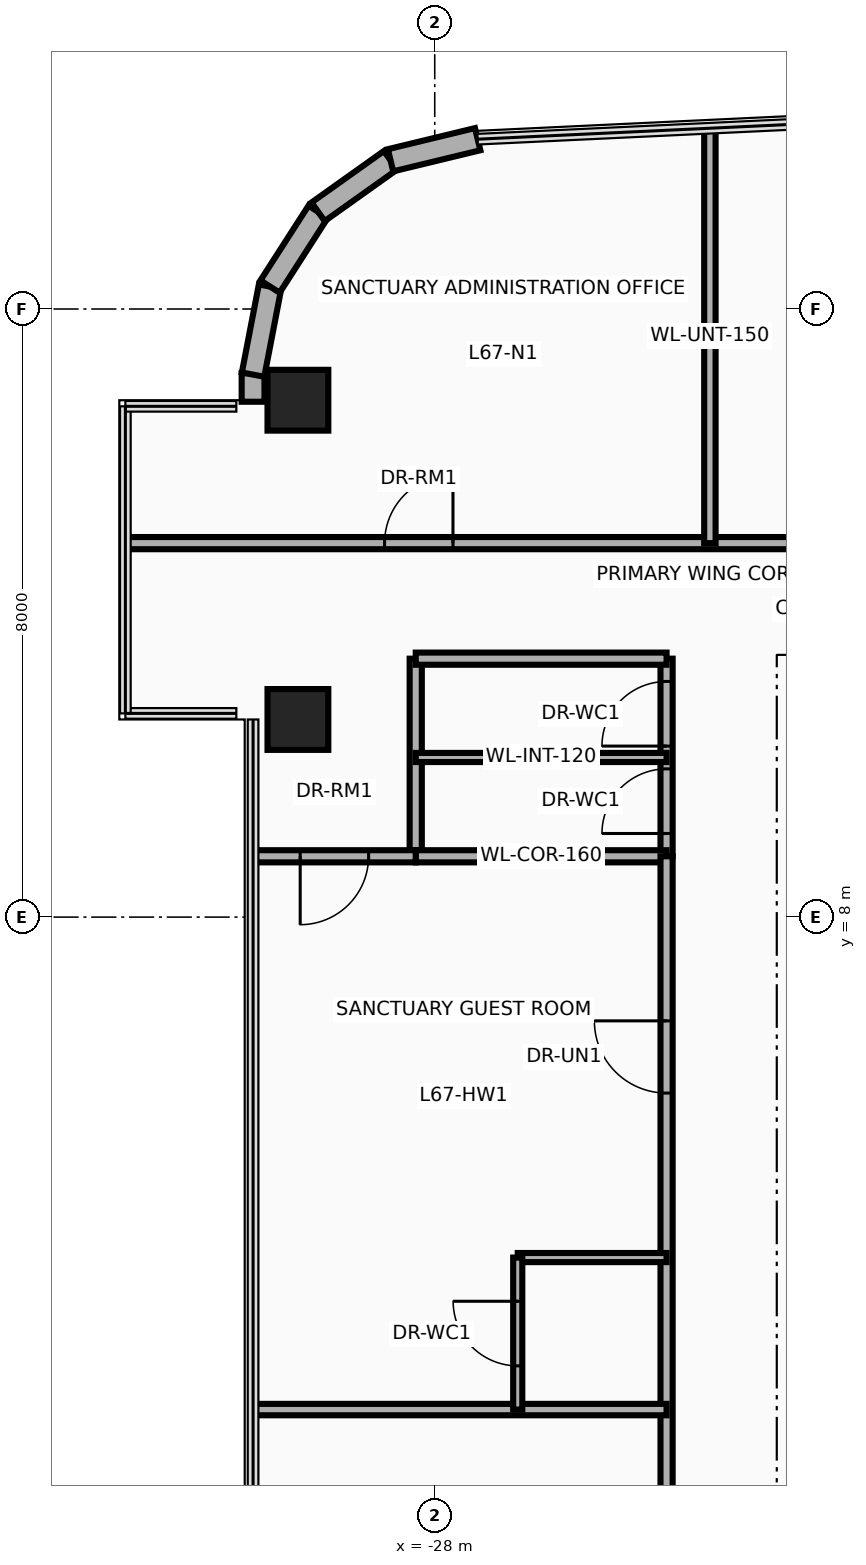
"""IFC4 building model, lengths in metres.
Left out: names, types, materials, properties, quantities, classifications, styles, units other than length and angle.
Written with IfcOpenShell. Run it as: python <this file> out.ifc"""

import sys

from ifc_helpers import new_model, si_unit, direction, frame, frame_2d, origin, origin_2d, place, context, subcontext, project, spatial, rectangle, extrude, source, transform, mapped, element, fill, save


model = new_model("IFC4")
c1 = context("Model", 3, precision=1e-05, world=origin(), true_north=direction((0.0, 1.0)))
c2 = subcontext(c1, "Body", "Model", "MODEL_VIEW")
j1 = project(units=[si_unit("LENGTHUNIT", "METRE"), si_unit("PLANEANGLEUNIT", "RADIAN")], contexts=[c1])
p1 = place(None, origin())
s1 = spatial("IfcSite", under=j1, at=p1, CompositionType="ELEMENT")
p2 = place(p1, origin())
s2 = spatial("IfcBuilding", under=s1, at=p2, CompositionType="ELEMENT")
p3 = place(p2, frame((0.0, 0.0, 258.0)))
s3 = spatial("IfcBuildingStorey", under=s2, at=p3, CompositionType="ELEMENT", Elevation=258.0)
m1 = source(origin(), c2, "Body", "SweptSolid", [
    extrude(rectangle(XDim=0.8, YDim=0.8, at=origin_2d()), origin(), (0.0, 0.0, 1.0), 3.5),
])
for number, where, z_axis, x_axis in (
    (1, (-29.8, 10.6, 0.0), (0.0, 0.0, 1.0), (1.0, 0.0, 0.0)),
    (2, (-29.8, 14.8, 0.0), (0.0, 0.0, 1.0), (1.0, 0.0, 0.0)),
):
    element("IfcColumn", number, at=place(p3, frame(where, z_axis=z_axis, x_axis=x_axis)), inside=s3, PredefinedType="COLUMN", context=c2, shape_type="MappedRepresentation", body=[
        mapped(m1, transform((0.0, 0.0, 0.0), x_axis=(1.0, 0.0, 0.0), y_axis=(0.0, 1.0, 0.0), z_axis=(0.0, 0.0, 1.0), scale=1.0)),
    ])
p4 = place(p3, frame((-30.39, 14.78, 0.0), z_axis=(0.0, 0.0, 1.0), x_axis=(0.0, 1.0, 0.0)))
e3 = element("IfcWall", 3, at=p4, inside=s3, PredefinedType="SOLIDWALL", context=c2, shape_type="SweptSolid", body=[
    extrude(rectangle(XDim=0.377, YDim=0.3, at=frame_2d((0.188, 0.0))), origin(), (0.0, 0.0, 1.0), 3.26),
])
p5 = place(p3, frame((-30.39, 15.137, 0.0), z_axis=(0.0, 0.0, 1.0), x_axis=(0.189307792679, 0.981917796779, 0.0)))
e4 = element("IfcWall", 4, at=p5, inside=s3, PredefinedType="SOLIDWALL", context=c2, shape_type="SweptSolid", body=[
    extrude(rectangle(XDim=1.18, YDim=0.3, at=frame_2d((0.59, 0.0))), origin(), (0.0, 0.0, 1.0), 3.26),
])
p6 = place(p3, frame((-30.167, 16.295, 0.0), z_axis=(0.0, 0.0, 1.0), x_axis=(0.540842020947, 0.841124193195, 0.0)))
e5 = element("IfcWall", 5, at=p6, inside=s3, PredefinedType="SOLIDWALL", context=c2, shape_type="SweptSolid", body=[
    extrude(rectangle(XDim=1.169, YDim=0.3, at=frame_2d((0.584, 0.0))), origin(), (0.0, 0.0, 1.0), 3.26),
])
p7 = place(p3, frame((-29.534, 17.279, 0.0), z_axis=(0.0, 0.0, 1.0), x_axis=(0.81466371606, 0.579933642527, 0.0)))
e6 = element("IfcWall", 6, at=p7, inside=s3, PredefinedType="SOLIDWALL", context=c2, shape_type="SweptSolid", body=[
    extrude(rectangle(XDim=1.169, YDim=0.3, at=frame_2d((0.584, 0.0))), origin(), (0.0, 0.0, 1.0), 3.26),
])
p8 = place(p3, frame((-28.582, 17.957, 0.0), z_axis=(0.0, 0.0, 1.0), x_axis=(0.971929016595, 0.235274279725, 0.0)))
e7 = element("IfcWall", 7, at=p8, inside=s3, PredefinedType="SOLIDWALL", context=c2, shape_type="SweptSolid", body=[
    extrude(rectangle(XDim=1.18, YDim=0.3, at=frame_2d((0.59, 0.0))), origin(), (0.0, 0.0, 1.0), 3.26),
])
p9 = place(p3, frame((-28.25, 8.8, 0.0), z_axis=(0.0, 0.0, 1.0), x_axis=(0.0, 1.0, 0.0)))
e8 = element("IfcWall", 8, at=p9, inside=s3, PredefinedType="PARTITIONING", context=c2, shape_type="SweptSolid", body=[
    extrude(rectangle(XDim=2.6, YDim=0.16, at=frame_2d((1.3, 0.0))), origin(), (0.0, 0.0, 1.0), 2.623),
])
p10 = place(p3, frame((-24.95, 8.8, 0.0), z_axis=(0.0, 0.0, 1.0), x_axis=(0.0, 1.0, 0.0)))
e9 = element("IfcWall", 9, at=p10, inside=s3, PredefinedType="PARTITIONING", context=c2, shape_type="SweptSolid", body=[
    extrude(rectangle(XDim=2.6, YDim=0.16, at=frame_2d((1.3, 0.0))), origin(), (0.0, 0.0, 1.0), 2.623),
])
p11 = place(p10, frame((0.3, 0.0, 0.0)))
e10 = element("IfcOpeningElement", 10, at=p11, cuts=e9, PredefinedType="OPENING", context=c2, shape_type="SweptSolid", body=[
    extrude(rectangle(XDim=0.85, YDim=2.1, at=frame_2d((0.425, 1.05))), frame((0.0, 0.095, 0.0), z_axis=(0.0, -1.0, 0.0), x_axis=(1.0, 0.0, 0.0)), (0.0, 0.0, 1.0), 0.19),
])
p12 = place(p10, frame((1.45, 0.0, 0.0)))
e11 = element("IfcOpeningElement", 11, at=p12, cuts=e9, PredefinedType="OPENING", context=c2, shape_type="SweptSolid", body=[
    extrude(rectangle(XDim=0.85, YDim=2.1, at=frame_2d((0.425, 1.05))), frame((0.0, 0.095, 0.0), z_axis=(0.0, -1.0, 0.0), x_axis=(1.0, 0.0, 0.0)), (0.0, 0.0, 1.0), 0.19),
])
for number, where, z_axis, x_axis in (
    (12, (-28.25, 8.8, 0.0), (0.0, 0.0, 1.0), (1.0, 0.0, 0.0)),
    (13, (-28.25, 11.4, 0.0), (0.0, 0.0, 1.0), (1.0, 0.0, 0.0)),
):
    element("IfcWall", number, at=place(p3, frame(where, z_axis=z_axis, x_axis=x_axis)), inside=s3, PredefinedType="PARTITIONING", context=c2, shape_type="SweptSolid", body=[
        extrude(rectangle(XDim=3.3, YDim=0.16, at=frame_2d((1.65, 0.0))), origin(), (0.0, 0.0, 1.0), 3.26),
    ])
p13 = place(p3, frame((-28.25, 10.1, 0.0), z_axis=(0.0, 0.0, 1.0), x_axis=(1.0, 0.0, 0.0)))
e14 = element("IfcWall", 14, at=p13, inside=s3, PredefinedType="PARTITIONING", context=c2, shape_type="SweptSolid", body=[
    extrude(rectangle(XDim=3.3, YDim=0.12, at=frame_2d((1.65, 0.0))), origin(), (0.0, 0.0, 1.0), 3.26),
])
p14 = place(p3, frame((-24.95, -11.42, 0.0), z_axis=(0.0, 0.0, 1.0), x_axis=(0.0, 1.0, 0.0)))
e15 = element("IfcWall", 15, at=p14, inside=s3, PredefinedType="PARTITIONING", context=c2, shape_type="SweptSolid", body=[
    extrude(rectangle(XDim=20.22, YDim=0.16, at=frame_2d((10.11, 0.0))), origin(), (0.0, 0.0, 1.0), 2.623),
])
p15 = place(p14, frame((2.785, 0.0, 0.0)))
e16 = element("IfcOpeningElement", 16, at=p15, cuts=e15, PredefinedType="OPENING", context=c2, shape_type="SweptSolid", body=[
    extrude(rectangle(XDim=0.9, YDim=2.1, at=frame_2d((0.45, 1.05))), frame((0.0, 0.095, 0.0), z_axis=(0.0, -1.0, 0.0), x_axis=(1.0, 0.0, 0.0)), (0.0, 0.0, 1.0), 0.19),
])
p16 = place(p14, frame((9.256, 0.0, 0.0)))
e17 = element("IfcOpeningElement", 17, at=p16, cuts=e15, PredefinedType="OPENING", context=c2, shape_type="SweptSolid", body=[
    extrude(rectangle(XDim=0.9, YDim=2.1, at=frame_2d((0.45, 1.05))), frame((0.0, 0.095, 0.0), z_axis=(0.0, -1.0, 0.0), x_axis=(1.0, 0.0, 0.0)), (0.0, 0.0, 1.0), 0.19),
])
p17 = place(p14, frame((17.105, 0.0, 0.0)))
e18 = element("IfcOpeningElement", 18, at=p17, cuts=e15, PredefinedType="OPENING", context=c2, shape_type="SweptSolid", body=[
    extrude(rectangle(XDim=0.95, YDim=2.15, at=frame_2d((0.475, 1.075))), frame((0.0, 0.095, 0.0), z_axis=(0.0, -1.0, 0.0), x_axis=(1.0, 0.0, 0.0)), (0.0, 0.0, 1.0), 0.19),
])
p18 = place(p3, frame((-30.39, 8.8, 0.0), z_axis=(0.0, 0.0, 1.0), x_axis=(1.0, 0.0, 0.0)))
e19 = element("IfcWall", 19, at=p18, inside=s3, PredefinedType="PARTITIONING", context=c2, shape_type="SweptSolid", body=[
    extrude(rectangle(XDim=2.14, YDim=0.16, at=frame_2d((1.07, 0.0))), origin(), (0.0, 0.0, 1.0), 2.706),
])
p19 = place(p18, frame((0.62, 0.0, 0.0)))
e20 = element("IfcOpeningElement", 20, at=p19, cuts=e19, PredefinedType="OPENING", context=c2, shape_type="SweptSolid", body=[
    extrude(rectangle(XDim=0.9, YDim=2.1, at=frame_2d((0.45, 1.05))), frame((0.0, 0.095, 0.0), z_axis=(0.0, -1.0, 0.0), x_axis=(1.0, 0.0, 0.0)), (0.0, 0.0, 1.0), 0.19),
])
p20 = place(p3, frame((-30.39, 1.521, 0.0), z_axis=(0.0, 0.0, 1.0), x_axis=(1.0, 0.0, 0.0)))
e21 = element("IfcWall", 21, at=p20, inside=s3, PredefinedType="PARTITIONING", context=c2, shape_type="SweptSolid", body=[
    extrude(rectangle(XDim=5.44, YDim=0.15, at=frame_2d((2.72, 0.0))), origin(), (0.0, 0.0, 1.0), 2.706),
])
p21 = place(p3, frame((-26.908, 3.521, 0.0), z_axis=(0.0, 0.0, 1.0), x_axis=(1.0, 0.0, 0.0)))
e22 = element("IfcWall", 22, at=p21, inside=s3, PredefinedType="PARTITIONING", context=c2, shape_type="SweptSolid", body=[
    extrude(rectangle(XDim=1.958, YDim=0.12, at=frame_2d((0.979, 0.0))), origin(), (0.0, 0.0, 1.0), 2.839),
])
p22 = place(p3, frame((-26.908, 1.521, 0.0), z_axis=(0.0, 0.0, 1.0), x_axis=(0.0, 1.0, 0.0)))
e23 = element("IfcWall", 23, at=p22, inside=s3, PredefinedType="PARTITIONING", context=c2, shape_type="SweptSolid", body=[
    extrude(rectangle(XDim=2.0, YDim=0.12, at=frame_2d((1.0, 0.0))), origin(), (0.0, 0.0, 1.0), 2.839),
])
p23 = place(p22, frame((0.575, 0.0, 0.0)))
e24 = element("IfcOpeningElement", 24, at=p23, cuts=e23, PredefinedType="OPENING", context=c2, shape_type="SweptSolid", body=[
    extrude(rectangle(XDim=0.85, YDim=2.1, at=frame_2d((0.425, 1.05))), frame((0.0, 0.075, 0.0), z_axis=(0.0, -1.0, 0.0), x_axis=(1.0, 0.0, 0.0)), (0.0, 0.0, 1.0), 0.15),
])
p24 = place(p3, frame((-32.04, 12.92, 0.0), z_axis=(0.0, 0.0, 1.0), x_axis=(1.0, 0.0, 0.0)))
e25 = element("IfcWall", 25, at=p24, inside=s3, PredefinedType="PARTITIONING", context=c2, shape_type="SweptSolid", body=[
    extrude(rectangle(XDim=31.13, YDim=0.16, at=frame_2d((15.565, 0.0))), origin(), (0.0, 0.0, 1.0), 2.634),
])
p25 = place(p24, frame((3.38, 0.0, 0.0)))
e26 = element("IfcOpeningElement", 26, at=p25, cuts=e25, PredefinedType="OPENING", context=c2, shape_type="SweptSolid", body=[
    extrude(rectangle(XDim=0.9, YDim=2.1, at=frame_2d((0.45, 1.05))), frame((0.0, 0.095, 0.0), z_axis=(0.0, -1.0, 0.0), x_axis=(1.0, 0.0, 0.0)), (0.0, 0.0, 1.0), 0.19),
])
p26 = place(p24, frame((11.14, 0.0, 0.0)))
e27 = element("IfcOpeningElement", 27, at=p26, cuts=e25, PredefinedType="OPENING", context=c2, shape_type="SweptSolid", body=[
    extrude(rectangle(XDim=0.9, YDim=2.1, at=frame_2d((0.45, 1.05))), frame((0.0, 0.095, 0.0), z_axis=(0.0, -1.0, 0.0), x_axis=(1.0, 0.0, 0.0)), (0.0, 0.0, 1.0), 0.19),
])
p27 = place(p24, frame((19.0, 0.0, 0.0)))
e28 = element("IfcOpeningElement", 28, at=p27, cuts=e25, PredefinedType="OPENING", context=c2, shape_type="SweptSolid", body=[
    extrude(rectangle(XDim=0.9, YDim=2.1, at=frame_2d((0.45, 1.05))), frame((0.0, 0.095, 0.0), z_axis=(0.0, -1.0, 0.0), x_axis=(1.0, 0.0, 0.0)), (0.0, 0.0, 1.0), 0.19),
])
p28 = place(p24, frame((26.805, 0.0, 0.0)))
e29 = element("IfcOpeningElement", 29, at=p28, cuts=e25, PredefinedType="OPENING", context=c2, shape_type="SweptSolid", body=[
    extrude(rectangle(XDim=0.9, YDim=2.1, at=frame_2d((0.45, 1.05))), frame((0.0, 0.095, 0.0), z_axis=(0.0, -1.0, 0.0), x_axis=(1.0, 0.0, 0.0)), (0.0, 0.0, 1.0), 0.19),
])
p29 = place(p3, frame((-24.38, 12.92, 0.0), z_axis=(0.0, 0.0, 1.0), x_axis=(0.0, 1.0, 0.0)))
e30 = element("IfcWall", 30, at=p29, inside=s3, PredefinedType="PARTITIONING", context=c2, shape_type="SweptSolid", body=[
    extrude(rectangle(XDim=5.458, YDim=0.15, at=frame_2d((2.729, 0.0))), origin(), (0.0, 0.0, 1.0), 2.623),
])
p30 = place(p11, origin())
e31 = element("IfcDoor", 31, at=p30, inside=s3, OperationType="SINGLE_SWING_LEFT", PredefinedType="DOOR", context=c2, shape_type="SweptSolid", body=[
    extrude(rectangle(XDim=0.85, YDim=2.1, at=frame_2d((0.425, 1.05))), frame((0.0, 0.025, 0.0), z_axis=(0.0, -1.0, 0.0), x_axis=(1.0, 0.0, 0.0)), (0.0, 0.0, 1.0), 0.05),
])
fill(e10, e31)
p31 = place(p12, origin())
e32 = element("IfcDoor", 32, at=p31, inside=s3, OperationType="SINGLE_SWING_RIGHT", PredefinedType="DOOR", context=c2, shape_type="SweptSolid", body=[
    extrude(rectangle(XDim=0.85, YDim=2.1, at=frame_2d((0.425, 1.05))), frame((0.0, 0.025, 0.0), z_axis=(0.0, -1.0, 0.0), x_axis=(1.0, 0.0, 0.0)), (0.0, 0.0, 1.0), 0.05),
])
fill(e11, e32)
p32 = place(p19, frame((0.9, 0.0, 0.0), z_axis=(0.0, 0.0, 1.0), x_axis=(-1.0, 0.0, 0.0)))
e33 = element("IfcDoor", 33, at=p32, inside=s3, OperationType="SINGLE_SWING_LEFT", PredefinedType="DOOR", context=c2, shape_type="SweptSolid", body=[
    extrude(rectangle(XDim=0.9, YDim=2.1, at=frame_2d((0.45, 1.05))), frame((0.0, 0.025, 0.0), z_axis=(0.0, -1.0, 0.0), x_axis=(1.0, 0.0, 0.0)), (0.0, 0.0, 1.0), 0.05),
])
fill(e20, e33)
p33 = place(p17, origin())
e34 = element("IfcDoor", 34, at=p33, inside=s3, OperationType="SINGLE_SWING_RIGHT", PredefinedType="DOOR", context=c2, shape_type="SweptSolid", body=[
    extrude(rectangle(XDim=0.95, YDim=2.15, at=frame_2d((0.475, 1.075))), frame((0.0, 0.025, 0.0), z_axis=(0.0, -1.0, 0.0), x_axis=(1.0, 0.0, 0.0)), (0.0, 0.0, 1.0), 0.05),
])
fill(e18, e34)
p34 = place(p23, origin())
e35 = element("IfcDoor", 35, at=p34, inside=s3, OperationType="SINGLE_SWING_LEFT", PredefinedType="DOOR", context=c2, shape_type="SweptSolid", body=[
    extrude(rectangle(XDim=0.85, YDim=2.1, at=frame_2d((0.425, 1.05))), frame((0.0, 0.025, 0.0), z_axis=(0.0, -1.0, 0.0), x_axis=(1.0, 0.0, 0.0)), (0.0, 0.0, 1.0), 0.05),
])
fill(e24, e35)
p35 = place(p25, origin())
e36 = element("IfcDoor", 36, at=p35, inside=s3, OperationType="SINGLE_SWING_RIGHT", PredefinedType="DOOR", context=c2, shape_type="SweptSolid", body=[
    extrude(rectangle(XDim=0.9, YDim=2.1, at=frame_2d((0.45, 1.05))), frame((0.0, 0.025, 0.0), z_axis=(0.0, -1.0, 0.0), x_axis=(1.0, 0.0, 0.0)), (0.0, 0.0, 1.0), 0.05),
])
fill(e26, e36)
save(model, sys.argv[1])
